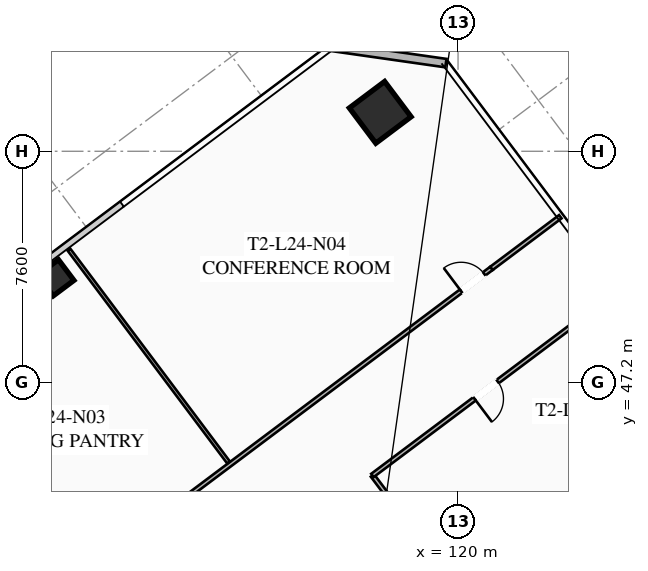
"""IFC4 building model, lengths in metres.
Left out: names, types, materials, properties, quantities, classifications, styles, units other than length and angle.
Written with IfcOpenShell. Run it as: python <this file> out.ifc"""

import sys

from ifc_helpers import new_model, si_unit, direction, frame, frame_2d, origin, origin_2d, place, context, subcontext, project, spatial, rectangle, hollow_rectangle, extrude, element, fill, save


model = new_model("IFC4")
c1 = context("Model", 3, precision=1e-05, world=origin(), true_north=direction((0.0, 1.0)))
c2 = subcontext(c1, "Body", "Model", "MODEL_VIEW")
j1 = project(units=[si_unit("LENGTHUNIT", "METRE"), si_unit("PLANEANGLEUNIT", "RADIAN")], contexts=[c1])
p1 = place(None, origin())
s1 = spatial("IfcSite", under=j1, at=p1, CompositionType="ELEMENT")
p2 = place(p1, origin())
s2 = spatial("IfcBuilding", under=s1, at=p2, CompositionType="ELEMENT")
p3 = place(p2, frame((0.0, 0.0, 92.05)))
s3 = spatial("IfcBuildingStorey", under=s2, at=p3, CompositionType="ELEMENT", Elevation=92.05)
p4 = place(p3, frame((117.44, 56.08, 0.0), z_axis=(0.0, 0.0, 1.0), x_axis=(0.799999996291, 0.600000004945, 0.0)))
e1 = element("IfcColumn", 1, at=p4, inside=s3, PredefinedType="COLUMN", context=c2, shape_type="SweptSolid", body=[
    extrude(hollow_rectangle(XDim=1.45, YDim=1.45, WallThickness=0.055, at=origin_2d()), origin(), (0.0, 0.0, 1.0), 3.35),
])
p5 = place(p3, frame((106.77, 50.64, 0.0), z_axis=(0.0, 0.0, 1.0), x_axis=(0.799999996291, 0.600000004945, 0.0)))
e2 = element("IfcColumn", 2, at=p5, inside=s3, PredefinedType="COLUMN", context=c2, shape_type="SweptSolid", body=[
    extrude(hollow_rectangle(XDim=0.85, YDim=0.85, WallThickness=0.035, at=origin_2d()), origin(), (0.0, 0.0, 1.0), 3.35),
])
p6 = place(p3, frame((115.82, 58.24, 0.0), z_axis=(0.0, 0.0, 1.0), x_axis=(0.989948214866, -0.141430307517, 0.0)))
e3 = element("IfcWall", 3, at=p6, inside=s3, PredefinedType="SOLIDWALL", context=c2, shape_type="SweptSolid", body=[
    extrude(rectangle(XDim=3.818, YDim=0.28, at=frame_2d((1.909, 0.0))), origin(), (0.0, 0.0, 1.0), 3.35),
])
p7 = place(p3, frame((119.824, 40.618, 0.0), z_axis=(0.0, 0.0, 1.0), x_axis=(-0.599982243973, 0.800013316712, 0.0)))
e4 = element("IfcWall", 4, at=p7, inside=s3, PredefinedType="PARTITIONING", context=c2, shape_type="SweptSolid", body=[
    extrude(rectangle(XDim=4.4, YDim=0.135, at=frame_2d((2.2, 0.0))), origin(), (0.0, 0.0, 1.0), 2.703),
])
p8 = place(p3, frame((98.316, 33.862, 0.0), z_axis=(0.0, 0.0, 1.0), x_axis=(0.8000041147, 0.599994513695, 0.0)))
e5 = element("IfcWall", 5, at=p8, inside=s3, PredefinedType="PARTITIONING", context=c2, shape_type="SweptSolid", body=[
    extrude(rectangle(XDim=28.48, YDim=0.135, at=frame_2d((14.24, 0.0))), origin(), (0.0, 0.0, 1.0), 2.703),
])
p9 = place(p8, frame((0.3, 0.0, 0.0)))
e6 = element("IfcOpeningElement", 6, at=p9, cuts=e5, PredefinedType="OPENING", context=c2, shape_type="SweptSolid", body=[
    extrude(rectangle(XDim=0.95, YDim=2.05, at=frame_2d((0.475, 1.025))), frame((0.0, 0.077, 0.0), z_axis=(0.0, -1.0, 0.0), x_axis=(1.0, 0.0, 0.0)), (0.0, 0.0, 1.0), 0.155),
])
p10 = place(p8, frame((7.195, 0.0, 0.0)))
e7 = element("IfcOpeningElement", 7, at=p10, cuts=e5, PredefinedType="OPENING", context=c2, shape_type="SweptSolid", body=[
    extrude(rectangle(XDim=0.95, YDim=2.05, at=frame_2d((0.475, 1.025))), frame((0.0, 0.077, 0.0), z_axis=(0.0, -1.0, 0.0), x_axis=(1.0, 0.0, 0.0)), (0.0, 0.0, 1.0), 0.155),
])
p11 = place(p8, frame((11.222, 0.0, 0.0)))
e8 = element("IfcOpeningElement", 8, at=p11, cuts=e5, PredefinedType="OPENING", context=c2, shape_type="SweptSolid", body=[
    extrude(rectangle(XDim=0.95, YDim=2.05, at=frame_2d((0.475, 1.025))), frame((0.0, 0.077, 0.0), z_axis=(0.0, -1.0, 0.0), x_axis=(1.0, 0.0, 0.0)), (0.0, 0.0, 1.0), 0.155),
])
p12 = place(p8, frame((27.23, 0.0, 0.0)))
e9 = element("IfcOpeningElement", 9, at=p12, cuts=e5, PredefinedType="OPENING", context=c2, shape_type="SweptSolid", body=[
    extrude(rectangle(XDim=0.95, YDim=2.05, at=frame_2d((0.475, 1.025))), frame((0.0, 0.077, 0.0), z_axis=(0.0, -1.0, 0.0), x_axis=(1.0, 0.0, 0.0)), (0.0, 0.0, 1.0), 0.155),
])
p13 = place(p3, frame((121.1, 50.95, 0.0), z_axis=(0.0, 0.0, 1.0), x_axis=(0.799989647378, 0.600013803248, 0.0)))
e10 = element("IfcWall", 10, at=p13, inside=s3, PredefinedType="PARTITIONING", context=c2, shape_type="SweptSolid", body=[
    extrude(rectangle(XDim=2.83, YDim=0.135, at=frame_2d((1.415, 0.0))), origin(), (0.0, 0.0, 1.0), 2.703),
])
p14 = place(p3, frame((112.452, 44.564, 0.0), z_axis=(0.0, 0.0, 1.0), x_axis=(-0.6, 0.8, 0.0)))
e11 = element("IfcWall", 11, at=p14, inside=s3, PredefinedType="PARTITIONING", context=c2, shape_type="SweptSolid", body=[
    extrude(rectangle(XDim=8.75, YDim=0.11, at=frame_2d((4.375, 0.0))), origin(), (0.0, 0.0, 1.0), 2.703),
])
p15 = place(p3, frame((125.224, 50.168, 0.0), z_axis=(0.0, 0.0, 1.0), x_axis=(-0.8, -0.6, 0.0)))
e12 = element("IfcWall", 12, at=p15, inside=s3, PredefinedType="PARTITIONING", context=c2, shape_type="SweptSolid", body=[
    extrude(rectangle(XDim=10.05, YDim=0.135, at=frame_2d((5.025, 0.0))), origin(), (0.0, 0.0, 1.0), 2.703),
])
p16 = place(p15, frame((4.9, 0.0, 0.0)))
e13 = element("IfcOpeningElement", 13, at=p16, cuts=e12, PredefinedType="OPENING", context=c2, shape_type="SweptSolid", body=[
    extrude(rectangle(XDim=0.95, YDim=2.05, at=frame_2d((0.475, 1.025))), frame((0.0, 0.077, 0.0), z_axis=(0.0, -1.0, 0.0), x_axis=(1.0, 0.0, 0.0)), (0.0, 0.0, 1.0), 0.155),
])
p17 = place(p3, frame((127.864, 46.648, 0.0), z_axis=(0.0, 0.0, 1.0), x_axis=(-0.800007145523, -0.599990472518, 0.0)))
e14 = element("IfcWall", 14, at=p17, inside=s3, PredefinedType="PARTITIONING", context=c2, shape_type="SweptSolid", body=[
    extrude(rectangle(XDim=8.2, YDim=0.11, at=frame_2d((4.1, 0.0))), origin(), (0.0, 0.0, 1.0), 2.703),
])
p18 = place(p12, origin())
e15 = element("IfcDoor", 15, at=p18, inside=s3, OperationType="SINGLE_SWING_LEFT", PredefinedType="DOOR", context=c2, shape_type="SweptSolid", body=[
    extrude(rectangle(XDim=0.95, YDim=2.05, at=frame_2d((0.475, 1.025))), frame((0.0, 0.025, 0.0), z_axis=(0.0, -1.0, 0.0), x_axis=(1.0, 0.0, 0.0)), (0.0, 0.0, 1.0), 0.05),
])
fill(e9, e15)
p19 = place(p16, origin())
e16 = element("IfcDoor", 16, at=p19, inside=s3, OperationType="SINGLE_SWING_RIGHT", PredefinedType="DOOR", context=c2, shape_type="SweptSolid", body=[
    extrude(rectangle(XDim=0.95, YDim=2.05, at=frame_2d((0.475, 1.025))), frame((0.0, 0.025, 0.0), z_axis=(0.0, -1.0, 0.0), x_axis=(1.0, 0.0, 0.0)), (0.0, 0.0, 1.0), 0.05),
])
fill(e13, e16)
save(model, sys.argv[1])
